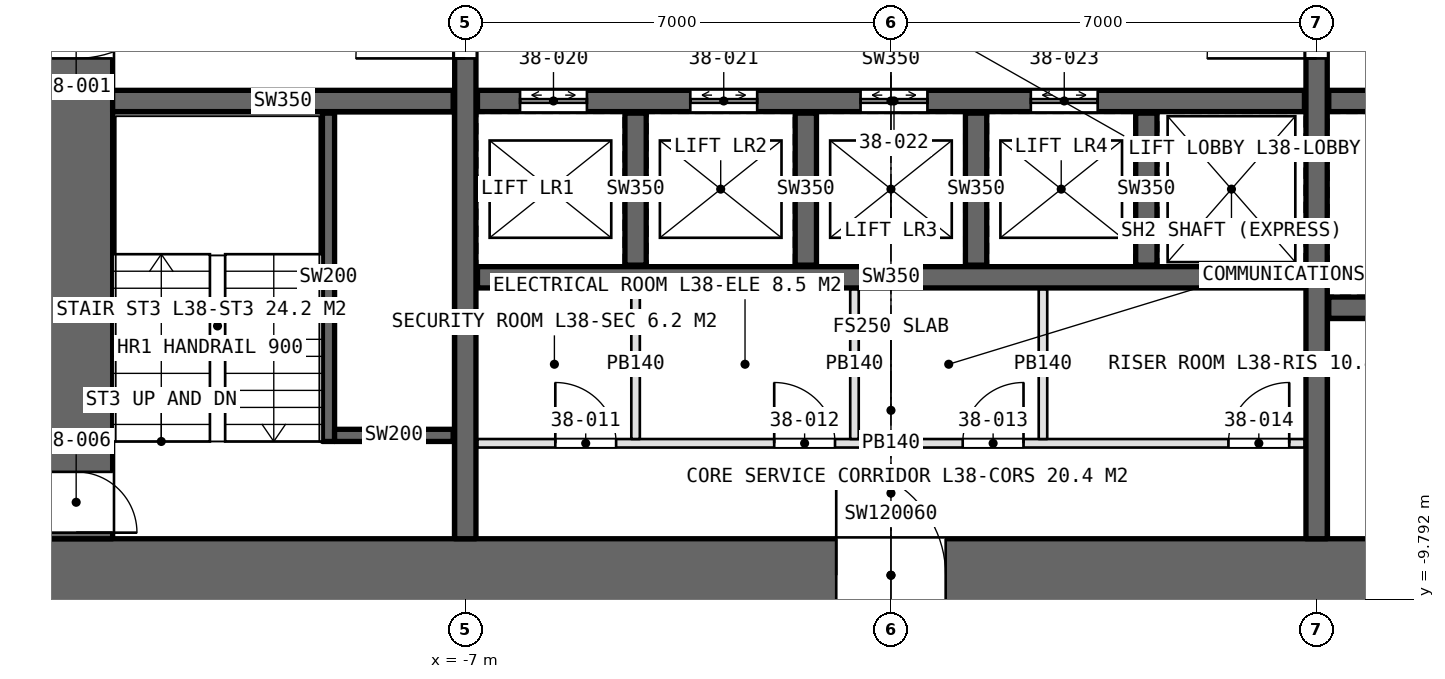
"""IFC4 building model, lengths in metres.
Left out: names, types, materials, properties, quantities, classifications, styles, units other than length and angle.
Written with IfcOpenShell. Run it as: python <this file> out.ifc"""

import sys

from ifc_helpers import new_model, si_unit, direction, frame, frame_2d, origin, place, context, subcontext, project, spatial, rectangle, extrude, element, fill, save


model = new_model("IFC4")
c1 = context("Model", 3, precision=1e-05, world=origin(), true_north=direction((0.0, 1.0)))
c2 = subcontext(c1, "Body", "Model", "MODEL_VIEW")
j1 = project(units=[si_unit("LENGTHUNIT", "METRE"), si_unit("PLANEANGLEUNIT", "RADIAN")], contexts=[c1])
p1 = place(None, origin())
s1 = spatial("IfcSite", under=j1, at=p1, CompositionType="ELEMENT")
p2 = place(p1, origin())
s2 = spatial("IfcBuilding", under=s1, at=p2, CompositionType="ELEMENT")
p3 = place(p2, frame((0.0, 0.0, 176.4)))
s3 = spatial("IfcBuildingStorey", under=s2, at=p3, CompositionType="ELEMENT", Elevation=176.4)
p4 = place(p3, frame((-14.0, -9.4, 0.0), z_axis=(0.0, 0.0, 1.0), x_axis=(1.0, 0.0, 0.0)))
e1 = element("IfcWall", 1, at=p4, inside=s3, PredefinedType="SHEAR", context=c2, shape_type="SweptSolid", body=[
    extrude(rectangle(XDim=28.0, YDim=1.2, at=frame_2d((14.0, 0.0))), origin(), (0.0, 0.0, 1.0), 4.2),
])
p5 = place(p4, frame((13.1, 0.0, 0.0)))
e2 = element("IfcOpeningElement", 2, at=p5, cuts=e1, PredefinedType="OPENING", context=c2, shape_type="SweptSolid", body=[
    extrude(rectangle(XDim=1.8, YDim=2.4, at=frame_2d((0.9, 1.2))), frame((0.0, 0.61, 0.0), z_axis=(0.0, -1.0, 0.0), x_axis=(1.0, 0.0, 0.0)), (0.0, 0.0, 1.0), 1.22),
])
p6 = place(p4, frame((22.9, 0.0, 0.0)))
e3 = element("IfcOpeningElement", 3, at=p6, cuts=e1, PredefinedType="OPENING", context=c2, shape_type="SweptSolid", body=[
    extrude(rectangle(XDim=2.2, YDim=2.7, at=frame_2d((1.1, 1.35))), frame((0.0, 0.61, 0.0), z_axis=(0.0, -1.0, 0.0), x_axis=(1.0, 0.0, 0.0)), (0.0, 0.0, 1.0), 1.22),
])
p7 = place(p3, frame((-13.4, 8.8, 0.0), z_axis=(0.0, 0.0, 1.0), x_axis=(0.0, -1.0, 0.0)))
e4 = element("IfcWall", 4, at=p7, inside=s3, PredefinedType="SHEAR", context=c2, shape_type="SweptSolid", body=[
    extrude(rectangle(XDim=17.6, YDim=1.2, at=frame_2d((8.8, 0.0))), origin(), (0.0, 0.0, 1.0), 4.2),
])
p8 = place(p7, frame((7.9, 0.0, 0.0)))
e5 = element("IfcOpeningElement", 5, at=p8, cuts=e4, PredefinedType="OPENING", context=c2, shape_type="SweptSolid", body=[
    extrude(rectangle(XDim=1.8, YDim=2.4, at=frame_2d((0.9, 1.2))), frame((0.0, 0.61, 0.0), z_axis=(0.0, -1.0, 0.0), x_axis=(1.0, 0.0, 0.0)), (0.0, 0.0, 1.0), 1.22),
])
p9 = place(p7, frame((16.5, 0.0, 0.0)))
e6 = element("IfcOpeningElement", 6, at=p9, cuts=e4, PredefinedType="OPENING", context=c2, shape_type="SweptSolid", body=[
    extrude(rectangle(XDim=1.0, YDim=2.4, at=frame_2d((0.5, 1.2))), frame((0.0, 0.61, 0.0), z_axis=(0.0, -1.0, 0.0), x_axis=(1.0, 0.0, 0.0)), (0.0, 0.0, 1.0), 1.22),
])
p10 = place(p3, frame((-7.0, -8.8, 0.0), z_axis=(0.0, 0.0, 1.0), x_axis=(0.0, 1.0, 0.0)))
e7 = element("IfcWall", 7, at=p10, inside=s3, PredefinedType="SHEAR", context=c2, shape_type="SweptSolid", body=[
    extrude(rectangle(XDim=17.6, YDim=0.35, at=frame_2d((8.8, 0.0))), origin(), (0.0, 0.0, 1.0), 4.2),
])
p11 = place(p10, frame((7.9, 0.0, 0.0)))
e8 = element("IfcOpeningElement", 8, at=p11, cuts=e7, PredefinedType="OPENING", context=c2, shape_type="SweptSolid", body=[
    extrude(rectangle(XDim=1.8, YDim=2.4, at=frame_2d((0.9, 1.2))), frame((0.0, 0.185, 0.0), z_axis=(0.0, -1.0, 0.0), x_axis=(1.0, 0.0, 0.0)), (0.0, 0.0, 1.0), 0.37),
])
p12 = place(p3, frame((7.0, -8.8, 0.0), z_axis=(0.0, 0.0, 1.0), x_axis=(0.0, 1.0, 0.0)))
e9 = element("IfcWall", 9, at=p12, inside=s3, PredefinedType="SHEAR", context=c2, shape_type="SweptSolid", body=[
    extrude(rectangle(XDim=17.6, YDim=0.35, at=frame_2d((8.8, 0.0))), origin(), (0.0, 0.0, 1.0), 4.2),
])
p13 = place(p12, frame((7.9, 0.0, 0.0)))
e10 = element("IfcOpeningElement", 10, at=p13, cuts=e9, PredefinedType="OPENING", context=c2, shape_type="SweptSolid", body=[
    extrude(rectangle(XDim=1.8, YDim=2.4, at=frame_2d((0.9, 1.2))), frame((0.0, 0.185, 0.0), z_axis=(0.0, -1.0, 0.0), x_axis=(1.0, 0.0, 0.0)), (0.0, 0.0, 1.0), 0.37),
])
p14 = place(p3, frame((-6.8, -1.6, 0.0), z_axis=(0.0, 0.0, 1.0), x_axis=(1.0, 0.0, 0.0)))
e11 = element("IfcWall", 11, at=p14, inside=s3, PredefinedType="SHEAR", context=c2, shape_type="SweptSolid", body=[
    extrude(rectangle(XDim=13.6, YDim=0.35, at=frame_2d((6.8, 0.0))), origin(), (0.0, 0.0, 1.0), 4.2),
])
p15 = place(p14, frame((0.7, 0.0, 0.0)))
e12 = element("IfcOpeningElement", 12, at=p15, cuts=e11, PredefinedType="OPENING", context=c2, shape_type="SweptSolid", body=[
    extrude(rectangle(XDim=1.1, YDim=2.4, at=frame_2d((0.55, 1.2))), frame((0.0, 0.185, 0.0), z_axis=(0.0, -1.0, 0.0), x_axis=(1.0, 0.0, 0.0)), (0.0, 0.0, 1.0), 0.37),
])
p16 = place(p14, frame((3.5, 0.0, 0.0)))
e13 = element("IfcOpeningElement", 13, at=p16, cuts=e11, PredefinedType="OPENING", context=c2, shape_type="SweptSolid", body=[
    extrude(rectangle(XDim=1.1, YDim=2.4, at=frame_2d((0.55, 1.2))), frame((0.0, 0.185, 0.0), z_axis=(0.0, -1.0, 0.0), x_axis=(1.0, 0.0, 0.0)), (0.0, 0.0, 1.0), 0.37),
])
p17 = place(p14, frame((6.3, 0.0, 0.0)))
e14 = element("IfcOpeningElement", 14, at=p17, cuts=e11, PredefinedType="OPENING", context=c2, shape_type="SweptSolid", body=[
    extrude(rectangle(XDim=1.1, YDim=2.4, at=frame_2d((0.55, 1.2))), frame((0.0, 0.185, 0.0), z_axis=(0.0, -1.0, 0.0), x_axis=(1.0, 0.0, 0.0)), (0.0, 0.0, 1.0), 0.37),
])
p18 = place(p14, frame((9.1, 0.0, 0.0)))
e15 = element("IfcOpeningElement", 15, at=p18, cuts=e11, PredefinedType="OPENING", context=c2, shape_type="SweptSolid", body=[
    extrude(rectangle(XDim=1.1, YDim=2.4, at=frame_2d((0.55, 1.2))), frame((0.0, 0.185, 0.0), z_axis=(0.0, -1.0, 0.0), x_axis=(1.0, 0.0, 0.0)), (0.0, 0.0, 1.0), 0.37),
])
p19 = place(p3, frame((-6.8, -4.5, 0.0), z_axis=(0.0, 0.0, 1.0), x_axis=(1.0, 0.0, 0.0)))
e16 = element("IfcWall", 16, at=p19, inside=s3, PredefinedType="SHEAR", context=c2, shape_type="SweptSolid", body=[
    extrude(rectangle(XDim=13.6, YDim=0.35, at=frame_2d((6.8, 0.0))), origin(), (0.0, 0.0, 1.0), 4.2),
])
p20 = place(p3, frame((-12.8, -1.6, 0.0), z_axis=(0.0, 0.0, 1.0), x_axis=(1.0, 0.0, 0.0)))
e17 = element("IfcWall", 17, at=p20, inside=s3, PredefinedType="SHEAR", context=c2, shape_type="SweptSolid", body=[
    extrude(rectangle(XDim=5.6, YDim=0.35, at=frame_2d((2.8, 0.0))), origin(), (0.0, 0.0, 1.0), 4.2),
])
p21 = place(p3, frame((7.2, -1.6, 0.0), z_axis=(0.0, 0.0, 1.0), x_axis=(1.0, 0.0, 0.0)))
e18 = element("IfcWall", 18, at=p21, inside=s3, PredefinedType="SHEAR", context=c2, shape_type="SweptSolid", body=[
    extrude(rectangle(XDim=5.6, YDim=0.35, at=frame_2d((2.8, 0.0))), origin(), (0.0, 0.0, 1.0), 4.2),
])
p22 = place(p21, frame((0.9, 0.0, 0.0)))
e19 = element("IfcOpeningElement", 19, at=p22, cuts=e18, PredefinedType="OPENING", context=c2, shape_type="SweptSolid", body=[
    extrude(rectangle(XDim=1.3, YDim=2.4, at=frame_2d((0.65, 1.2))), frame((0.0, 0.185, 0.0), z_axis=(0.0, -1.0, 0.0), x_axis=(1.0, 0.0, 0.0)), (0.0, 0.0, 1.0), 0.37),
])
p23 = place(p21, frame((3.9, 0.0, 0.0)))
e20 = element("IfcOpeningElement", 20, at=p23, cuts=e18, PredefinedType="OPENING", context=c2, shape_type="SweptSolid", body=[
    extrude(rectangle(XDim=1.3, YDim=2.4, at=frame_2d((0.65, 1.2))), frame((0.0, 0.185, 0.0), z_axis=(0.0, -1.0, 0.0), x_axis=(1.0, 0.0, 0.0)), (0.0, 0.0, 1.0), 0.37),
])
p24 = place(p3, frame((7.2, -5.0, 0.0), z_axis=(0.0, 0.0, 1.0), x_axis=(1.0, 0.0, 0.0)))
e21 = element("IfcWall", 21, at=p24, inside=s3, PredefinedType="SHEAR", context=c2, shape_type="SweptSolid", body=[
    extrude(rectangle(XDim=5.6, YDim=0.35, at=frame_2d((2.8, 0.0))), origin(), (0.0, 0.0, 1.0), 4.2),
])
for number, where, z_axis, x_axis in (
    (22, (-4.2, -4.3, 0.0), (0.0, 0.0, 1.0), (0.0, 1.0, 0.0)),
    (23, (-1.4, -4.3, 0.0), (0.0, 0.0, 1.0), (0.0, 1.0, 0.0)),
    (24, (1.4, -4.3, 0.0), (0.0, 0.0, 1.0), (0.0, 1.0, 0.0)),
    (25, (4.2, -4.3, 0.0), (0.0, 0.0, 1.0), (0.0, 1.0, 0.0)),
):
    element("IfcWall", number, at=place(p3, frame(where, z_axis=z_axis, x_axis=x_axis)), inside=s3, PredefinedType="SHEAR", context=c2, shape_type="SweptSolid", body=[
        extrude(rectangle(XDim=2.5, YDim=0.35, at=frame_2d((1.25, 0.0))), origin(), (0.0, 0.0, 1.0), 4.2),
    ])
p25 = place(p3, frame((-6.8, -7.23, 0.0), z_axis=(0.0, 0.0, 1.0), x_axis=(1.0, 0.0, 0.0)))
e26 = element("IfcWall", 26, at=p25, inside=s3, PredefinedType="PARTITIONING", context=c2, shape_type="SweptSolid", body=[
    extrude(rectangle(XDim=13.6, YDim=0.14, at=frame_2d((6.8, 0.0))), origin(), (0.0, 0.0, 1.0), 3.95),
])
p26 = place(p25, frame((1.28, 0.0, 0.0)))
e27 = element("IfcOpeningElement", 27, at=p26, cuts=e26, PredefinedType="OPENING", context=c2, shape_type="SweptSolid", body=[
    extrude(rectangle(XDim=1.0, YDim=2.4, at=frame_2d((0.5, 1.2))), frame((0.0, 0.08, 0.0), z_axis=(0.0, -1.0, 0.0), x_axis=(1.0, 0.0, 0.0)), (0.0, 0.0, 1.0), 0.16),
])
p27 = place(p25, frame((4.88, 0.0, 0.0)))
e28 = element("IfcOpeningElement", 28, at=p27, cuts=e26, PredefinedType="OPENING", context=c2, shape_type="SweptSolid", body=[
    extrude(rectangle(XDim=1.0, YDim=2.4, at=frame_2d((0.5, 1.2))), frame((0.0, 0.08, 0.0), z_axis=(0.0, -1.0, 0.0), x_axis=(1.0, 0.0, 0.0)), (0.0, 0.0, 1.0), 0.16),
])
p28 = place(p25, frame((7.98, 0.0, 0.0)))
e29 = element("IfcOpeningElement", 29, at=p28, cuts=e26, PredefinedType="OPENING", context=c2, shape_type="SweptSolid", body=[
    extrude(rectangle(XDim=1.0, YDim=2.4, at=frame_2d((0.5, 1.2))), frame((0.0, 0.08, 0.0), z_axis=(0.0, -1.0, 0.0), x_axis=(1.0, 0.0, 0.0)), (0.0, 0.0, 1.0), 0.16),
])
p29 = place(p25, frame((12.35, 0.0, 0.0)))
e30 = element("IfcOpeningElement", 30, at=p29, cuts=e26, PredefinedType="OPENING", context=c2, shape_type="SweptSolid", body=[
    extrude(rectangle(XDim=1.0, YDim=2.4, at=frame_2d((0.5, 1.2))), frame((0.0, 0.08, 0.0), z_axis=(0.0, -1.0, 0.0), x_axis=(1.0, 0.0, 0.0)), (0.0, 0.0, 1.0), 0.16),
])
for number, where, z_axis, x_axis in (
    (31, (-4.2, -4.7, 0.0), (0.0, 0.0, 1.0), (0.0, -1.0, 0.0)),
    (32, (-0.6, -4.7, 0.0), (0.0, 0.0, 1.0), (0.0, -1.0, 0.0)),
    (33, (2.5, -4.7, 0.0), (0.0, 0.0, 1.0), (0.0, -1.0, 0.0)),
):
    element("IfcWall", number, at=place(p3, frame(where, z_axis=z_axis, x_axis=x_axis)), inside=s3, PredefinedType="PARTITIONING", context=c2, shape_type="SweptSolid", body=[
        extrude(rectangle(XDim=2.46, YDim=0.14, at=frame_2d((1.23, 0.0))), origin(), (0.0, 0.0, 1.0), 3.95),
    ])
p30 = place(p3, frame((-9.25, -7.2, 0.0), z_axis=(0.0, 0.0, 1.0), x_axis=(0.0, 1.0, 0.0)))
e34 = element("IfcWall", 34, at=p30, inside=s3, PredefinedType="SOLIDWALL", context=c2, shape_type="SweptSolid", body=[
    extrude(rectangle(XDim=5.4, YDim=0.2, at=frame_2d((2.7, 0.0))), origin(), (0.0, 0.0, 1.0), 4.2),
])
p31 = place(p3, frame((-9.15, -7.1, 0.0), z_axis=(0.0, 0.0, 1.0), x_axis=(1.0, 0.0, 0.0)))
e35 = element("IfcWall", 35, at=p31, inside=s3, PredefinedType="SOLIDWALL", context=c2, shape_type="SweptSolid", body=[
    extrude(rectangle(XDim=1.95, YDim=0.2, at=frame_2d((0.975, 0.0))), origin(), (0.0, 0.0, 1.0), 4.2),
])
p32 = place(p8, origin())
e36 = element("IfcDoor", 36, at=p32, inside=s3, OperationType="DOUBLE_DOOR_SINGLE_SWING", PredefinedType="DOOR", context=c2, shape_type="SweptSolid", body=[
    extrude(rectangle(XDim=1.8, YDim=2.4, at=frame_2d((0.9, 1.2))), frame((0.0, 0.025, 0.0), z_axis=(0.0, -1.0, 0.0), x_axis=(1.0, 0.0, 0.0)), (0.0, 0.0, 1.0), 0.05),
])
fill(e5, e36)
p33 = place(p11, origin())
e37 = element("IfcDoor", 37, at=p33, inside=s3, OperationType="DOUBLE_DOOR_SINGLE_SWING", PredefinedType="DOOR", context=c2, shape_type="SweptSolid", body=[
    extrude(rectangle(XDim=1.8, YDim=2.4, at=frame_2d((0.9, 1.2))), frame((0.0, 0.025, 0.0), z_axis=(0.0, -1.0, 0.0), x_axis=(1.0, 0.0, 0.0)), (0.0, 0.0, 1.0), 0.05),
])
fill(e8, e37)
p34 = place(p13, origin())
e38 = element("IfcDoor", 38, at=p34, inside=s3, OperationType="DOUBLE_DOOR_SINGLE_SWING", PredefinedType="DOOR", context=c2, shape_type="SweptSolid", body=[
    extrude(rectangle(XDim=1.8, YDim=2.4, at=frame_2d((0.9, 1.2))), frame((0.0, 0.025, 0.0), z_axis=(0.0, -1.0, 0.0), x_axis=(1.0, 0.0, 0.0)), (0.0, 0.0, 1.0), 0.05),
])
fill(e10, e38)
p35 = place(p9, origin())
e39 = element("IfcDoor", 39, at=p35, inside=s3, OperationType="SINGLE_SWING_RIGHT", PredefinedType="DOOR", context=c2, shape_type="SweptSolid", body=[
    extrude(rectangle(XDim=1.0, YDim=2.4, at=frame_2d((0.5, 1.2))), frame((0.0, 0.025, 0.0), z_axis=(0.0, -1.0, 0.0), x_axis=(1.0, 0.0, 0.0)), (0.0, 0.0, 1.0), 0.05),
])
fill(e6, e39)
p36 = place(p26, origin())
e40 = element("IfcDoor", 40, at=p36, inside=s3, OperationType="SINGLE_SWING_LEFT", PredefinedType="DOOR", context=c2, shape_type="SweptSolid", body=[
    extrude(rectangle(XDim=1.0, YDim=2.4, at=frame_2d((0.5, 1.2))), frame((0.0, 0.025, 0.0), z_axis=(0.0, -1.0, 0.0), x_axis=(1.0, 0.0, 0.0)), (0.0, 0.0, 1.0), 0.05),
])
fill(e27, e40)
p37 = place(p27, origin())
e41 = element("IfcDoor", 41, at=p37, inside=s3, OperationType="SINGLE_SWING_LEFT", PredefinedType="DOOR", context=c2, shape_type="SweptSolid", body=[
    extrude(rectangle(XDim=1.0, YDim=2.4, at=frame_2d((0.5, 1.2))), frame((0.0, 0.025, 0.0), z_axis=(0.0, -1.0, 0.0), x_axis=(1.0, 0.0, 0.0)), (0.0, 0.0, 1.0), 0.05),
])
fill(e28, e41)
p38 = place(p28, origin())
e42 = element("IfcDoor", 42, at=p38, inside=s3, OperationType="SINGLE_SWING_RIGHT", PredefinedType="DOOR", context=c2, shape_type="SweptSolid", body=[
    extrude(rectangle(XDim=1.0, YDim=2.4, at=frame_2d((0.5, 1.2))), frame((0.0, 0.025, 0.0), z_axis=(0.0, -1.0, 0.0), x_axis=(1.0, 0.0, 0.0)), (0.0, 0.0, 1.0), 0.05),
])
fill(e29, e42)
p39 = place(p29, origin())
e43 = element("IfcDoor", 43, at=p39, inside=s3, OperationType="SINGLE_SWING_RIGHT", PredefinedType="DOOR", context=c2, shape_type="SweptSolid", body=[
    extrude(rectangle(XDim=1.0, YDim=2.4, at=frame_2d((0.5, 1.2))), frame((0.0, 0.025, 0.0), z_axis=(0.0, -1.0, 0.0), x_axis=(1.0, 0.0, 0.0)), (0.0, 0.0, 1.0), 0.05),
])
fill(e30, e43)
p40 = place(p5, origin())
e44 = element("IfcDoor", 44, at=p40, inside=s3, OperationType="DOUBLE_DOOR_SINGLE_SWING", PredefinedType="DOOR", context=c2, shape_type="SweptSolid", body=[
    extrude(rectangle(XDim=1.8, YDim=2.4, at=frame_2d((0.9, 1.2))), frame((0.0, 0.025, 0.0), z_axis=(0.0, -1.0, 0.0), x_axis=(1.0, 0.0, 0.0)), (0.0, 0.0, 1.0), 0.05),
])
fill(e2, e44)
p41 = place(p15, origin())
e45 = element("IfcDoor", 45, at=p41, inside=s3, OperationType="DOUBLE_DOOR_SLIDING", PredefinedType="DOOR", context=c2, shape_type="SweptSolid", body=[
    extrude(rectangle(XDim=1.1, YDim=2.4, at=frame_2d((0.55, 1.2))), frame((0.0, 0.025, 0.0), z_axis=(0.0, -1.0, 0.0), x_axis=(1.0, 0.0, 0.0)), (0.0, 0.0, 1.0), 0.05),
])
fill(e12, e45)
p42 = place(p16, origin())
e46 = element("IfcDoor", 46, at=p42, inside=s3, OperationType="DOUBLE_DOOR_SLIDING", PredefinedType="DOOR", context=c2, shape_type="SweptSolid", body=[
    extrude(rectangle(XDim=1.1, YDim=2.4, at=frame_2d((0.55, 1.2))), frame((0.0, 0.025, 0.0), z_axis=(0.0, -1.0, 0.0), x_axis=(1.0, 0.0, 0.0)), (0.0, 0.0, 1.0), 0.05),
])
fill(e13, e46)
p43 = place(p17, origin())
e47 = element("IfcDoor", 47, at=p43, inside=s3, OperationType="DOUBLE_DOOR_SLIDING", PredefinedType="DOOR", context=c2, shape_type="SweptSolid", body=[
    extrude(rectangle(XDim=1.1, YDim=2.4, at=frame_2d((0.55, 1.2))), frame((0.0, 0.025, 0.0), z_axis=(0.0, -1.0, 0.0), x_axis=(1.0, 0.0, 0.0)), (0.0, 0.0, 1.0), 0.05),
])
fill(e14, e47)
p44 = place(p18, origin())
e48 = element("IfcDoor", 48, at=p44, inside=s3, OperationType="DOUBLE_DOOR_SLIDING", PredefinedType="DOOR", context=c2, shape_type="SweptSolid", body=[
    extrude(rectangle(XDim=1.1, YDim=2.4, at=frame_2d((0.55, 1.2))), frame((0.0, 0.025, 0.0), z_axis=(0.0, -1.0, 0.0), x_axis=(1.0, 0.0, 0.0)), (0.0, 0.0, 1.0), 0.05),
])
fill(e15, e48)
save(model, sys.argv[1])
